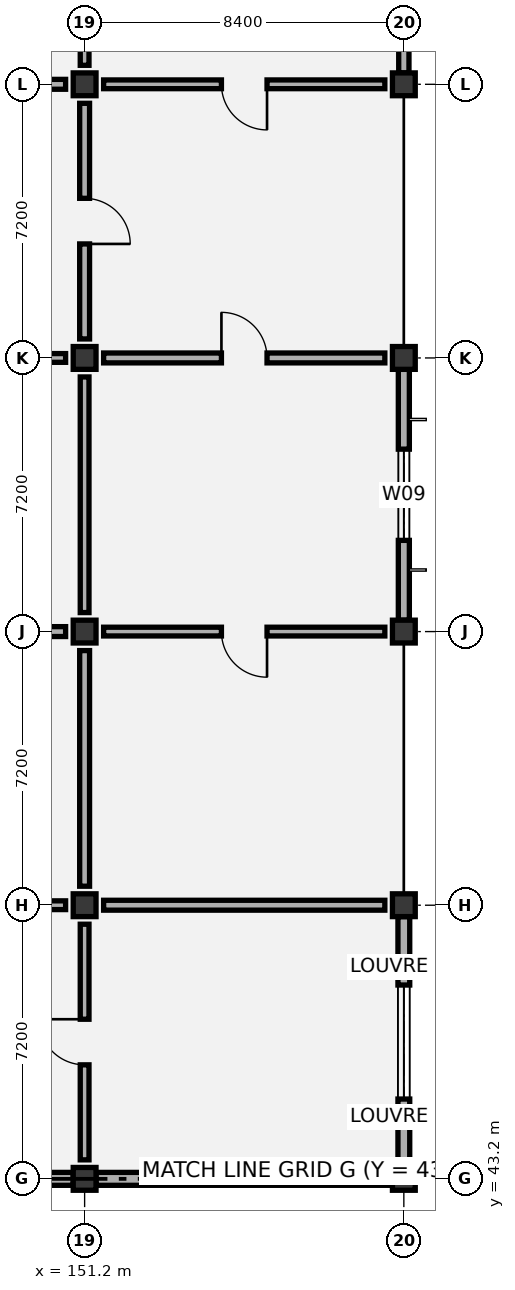
"""IFC4 building model, lengths in metres.
Left out: names, types, materials, properties, quantities, classifications, styles, units other than length and angle.
Written with IfcOpenShell. Run it as: python <this file> out.ifc"""

import sys

from ifc_helpers import new_model, si_unit, direction, frame, frame_2d, origin, origin_2d, place, context, subcontext, project, spatial, rectangle, extrude, element, fill, save


model = new_model("IFC4")
c1 = context("Model", 3, precision=1e-05, world=origin(), true_north=direction((0.0, 1.0)))
c2 = subcontext(c1, "Body", "Model", "MODEL_VIEW")
j1 = project(units=[si_unit("LENGTHUNIT", "METRE"), si_unit("PLANEANGLEUNIT", "RADIAN")], contexts=[c1])
p1 = place(None, origin())
s1 = spatial("IfcSite", under=j1, at=p1, CompositionType="ELEMENT")
p2 = place(p1, origin())
s2 = spatial("IfcBuilding", under=s1, at=p2, CompositionType="ELEMENT")
p3 = place(p2, frame((0.0, 0.0, 11.4)))
s3 = spatial("IfcBuildingStorey", under=s2, at=p3, CompositionType="ELEMENT", Elevation=11.4)
for number, where, z_axis, x_axis in (
    (1, (151.2, 43.2, 0.0), (0.0, 0.0, 1.0), (1.0, 0.0, 0.0)),
    (2, (151.2, 50.4, 0.0), (0.0, 0.0, 1.0), (1.0, 0.0, 0.0)),
    (3, (151.2, 57.6, 0.0), (0.0, 0.0, 1.0), (1.0, 0.0, 0.0)),
    (4, (151.2, 64.8, 0.0), (0.0, 0.0, 1.0), (1.0, 0.0, 0.0)),
    (5, (151.2, 72.0, 0.0), (0.0, 0.0, 1.0), (1.0, 0.0, 0.0)),
    (6, (159.6, 43.2, 0.0), (0.0, 0.0, 1.0), (1.0, 0.0, 0.0)),
    (7, (159.6, 50.4, 0.0), (0.0, 0.0, 1.0), (1.0, 0.0, 0.0)),
    (8, (159.6, 57.6, 0.0), (0.0, 0.0, 1.0), (1.0, 0.0, 0.0)),
    (9, (159.6, 64.8, 0.0), (0.0, 0.0, 1.0), (1.0, 0.0, 0.0)),
    (10, (159.6, 72.0, 0.0), (0.0, 0.0, 1.0), (1.0, 0.0, 0.0)),
):
    element("IfcColumn", number, at=place(p3, frame(where, z_axis=z_axis, x_axis=x_axis)), inside=s3, PredefinedType="COLUMN", context=c2, shape_type="SweptSolid", body=[
        extrude(rectangle(XDim=0.6, YDim=0.6, at=origin_2d()), origin(), (0.0, 0.0, 1.0), 5.4),
    ])
p4 = place(p3, frame((143.1, 43.2, 0.0), z_axis=(0.0, 0.0, 1.0), x_axis=(1.0, 0.0, 0.0)))
e11 = element("IfcWall", 11, at=p4, inside=s3, PredefinedType="SOLIDWALL", context=c2, shape_type="SweptSolid", body=[
    extrude(rectangle(XDim=7.8, YDim=0.34, at=frame_2d((3.9, 0.0))), origin(), (0.0, 0.0, 1.0), 4.445),
])
p5 = place(p3, frame((151.5, 43.2, 0.0), z_axis=(0.0, 0.0, 1.0), x_axis=(1.0, 0.0, 0.0)))
e12 = element("IfcWall", 12, at=p5, inside=s3, PredefinedType="SOLIDWALL", context=c2, shape_type="SweptSolid", body=[
    extrude(rectangle(XDim=7.8, YDim=0.34, at=frame_2d((3.9, 0.0))), origin(), (0.0, 0.0, 1.0), 4.52),
])
p6 = place(p3, frame((159.6, 43.5, 0.0), z_axis=(0.0, 0.0, 1.0), x_axis=(0.0, 1.0, 0.0)))
e13 = element("IfcWall", 13, at=p6, inside=s3, PredefinedType="SOLIDWALL", context=c2, shape_type="SweptSolid", body=[
    extrude(rectangle(XDim=6.6, YDim=0.31, at=frame_2d((3.3, 0.0))), origin(), (0.0, 0.0, 1.0), 4.52),
])
p7 = place(p6, frame((1.8, 0.0, 0.9)))
e14 = element("IfcOpeningElement", 14, at=p7, cuts=e13, PredefinedType="OPENING", context=c2, shape_type="SweptSolid", body=[
    extrude(rectangle(XDim=3.0, YDim=2.1, at=frame_2d((1.5, 1.05))), frame((0.0, 0.165, 0.0), z_axis=(0.0, -1.0, 0.0), x_axis=(1.0, 0.0, 0.0)), (0.0, 0.0, 1.0), 0.33),
])
p8 = place(p3, frame((159.6, 57.9, 0.0), z_axis=(0.0, 0.0, 1.0), x_axis=(0.0, 1.0, 0.0)))
e15 = element("IfcWall", 15, at=p8, inside=s3, PredefinedType="SOLIDWALL", context=c2, shape_type="SweptSolid", body=[
    extrude(rectangle(XDim=6.6, YDim=0.29, at=frame_2d((3.3, 0.0))), origin(), (0.0, 0.0, 1.0), 4.52),
])
p9 = place(p8, frame((2.1, 0.0, 0.9)))
e16 = element("IfcOpeningElement", 16, at=p9, cuts=e15, PredefinedType="OPENING", context=c2, shape_type="SweptSolid", body=[
    extrude(rectangle(XDim=2.4, YDim=2.1, at=frame_2d((1.2, 1.05))), frame((0.0, 0.155, 0.0), z_axis=(0.0, -1.0, 0.0), x_axis=(1.0, 0.0, 0.0)), (0.0, 0.0, 1.0), 0.31),
])
p10 = place(p3, frame((159.6, 72.3, 0.0), z_axis=(0.0, 0.0, 1.0), x_axis=(0.0, 1.0, 0.0)))
e17 = element("IfcWall", 17, at=p10, inside=s3, PredefinedType="SOLIDWALL", context=c2, shape_type="SweptSolid", body=[
    extrude(rectangle(XDim=6.6, YDim=0.27, at=frame_2d((3.3, 0.0))), origin(), (0.0, 0.0, 1.0), 4.52),
])
p11 = place(p10, frame((1.5, 0.0, 0.9)))
e18 = element("IfcOpeningElement", 18, at=p11, cuts=e17, PredefinedType="OPENING", context=c2, shape_type="SweptSolid", body=[
    extrude(rectangle(XDim=3.6, YDim=2.4, at=frame_2d((1.8, 1.2))), frame((0.0, 0.145, 0.0), z_axis=(0.0, -1.0, 0.0), x_axis=(1.0, 0.0, 0.0)), (0.0, 0.0, 1.0), 0.29),
])
p12 = place(p3, frame((159.72, 43.2, 0.0), z_axis=(0.0, 0.0, 1.0), x_axis=(1.0, 0.0, 0.0)))
e19 = element("IfcWall", 19, at=p12, inside=s3, PredefinedType="PARAPET", context=c2, shape_type="SweptSolid", body=[
    extrude(rectangle(XDim=8.16, YDim=0.22, at=frame_2d((4.08, 0.0))), origin(), (0.0, 0.0, 1.0), 1.15),
])
p13 = place(p3, frame((151.2, 43.7, 0.0), z_axis=(0.0, 0.0, 1.0), x_axis=(0.0, 1.0, 0.0)))
e20 = element("IfcWall", 20, at=p13, inside=s3, PredefinedType="PARTITIONING", context=c2, shape_type="SweptSolid", body=[
    extrude(rectangle(XDim=6.2, YDim=0.23, at=frame_2d((3.1, 0.0))), origin(), (0.0, 0.0, 1.0), 4.805),
])
p14 = place(p13, frame((2.5, 0.0, 0.0)))
e21 = element("IfcOpeningElement", 21, at=p14, cuts=e20, PredefinedType="OPENING", context=c2, shape_type="SweptSolid", body=[
    extrude(rectangle(XDim=1.2, YDim=2.1, at=frame_2d((0.6, 1.05))), frame((0.0, 0.125, 0.0), z_axis=(0.0, -1.0, 0.0), x_axis=(1.0, 0.0, 0.0)), (0.0, 0.0, 1.0), 0.25),
])
p15 = place(p3, frame((143.3, 50.4, 0.0), z_axis=(0.0, 0.0, 1.0), x_axis=(1.0, 0.0, 0.0)))
e22 = element("IfcWall", 22, at=p15, inside=s3, PredefinedType="PARTITIONING", context=c2, shape_type="SweptSolid", body=[
    extrude(rectangle(XDim=7.4, YDim=0.23, at=frame_2d((3.7, 0.0))), origin(), (0.0, 0.0, 1.0), 4.345),
])
p16 = place(p3, frame((151.2, 50.9, 0.0), z_axis=(0.0, 0.0, 1.0), x_axis=(0.0, 1.0, 0.0)))
e23 = element("IfcWall", 23, at=p16, inside=s3, PredefinedType="PARTITIONING", context=c2, shape_type="SweptSolid", body=[
    extrude(rectangle(XDim=6.2, YDim=0.26, at=frame_2d((3.1, 0.0))), origin(), (0.0, 0.0, 1.0), 4.395),
])
p17 = place(p3, frame((143.3, 57.6, 0.0), z_axis=(0.0, 0.0, 1.0), x_axis=(1.0, 0.0, 0.0)))
e24 = element("IfcWall", 24, at=p17, inside=s3, PredefinedType="PARTITIONING", context=c2, shape_type="SweptSolid", body=[
    extrude(rectangle(XDim=7.4, YDim=0.26, at=frame_2d((3.7, 0.0))), origin(), (0.0, 0.0, 1.0), 4.345),
])
p18 = place(p17, frame((3.1, 0.0, 0.0)))
e25 = element("IfcOpeningElement", 25, at=p18, cuts=e24, PredefinedType="OPENING", context=c2, shape_type="SweptSolid", body=[
    extrude(rectangle(XDim=1.2, YDim=2.1, at=frame_2d((0.6, 1.05))), frame((0.0, 0.14, 0.0), z_axis=(0.0, -1.0, 0.0), x_axis=(1.0, 0.0, 0.0)), (0.0, 0.0, 1.0), 0.28),
])
p19 = place(p3, frame((151.2, 58.1, 0.0), z_axis=(0.0, 0.0, 1.0), x_axis=(0.0, 1.0, 0.0)))
e26 = element("IfcWall", 26, at=p19, inside=s3, PredefinedType="PARTITIONING", context=c2, shape_type="SweptSolid", body=[
    extrude(rectangle(XDim=6.2, YDim=0.23, at=frame_2d((3.1, 0.0))), origin(), (0.0, 0.0, 1.0), 4.595),
])
p20 = place(p3, frame((143.3, 64.8, 0.0), z_axis=(0.0, 0.0, 1.0), x_axis=(1.0, 0.0, 0.0)))
e27 = element("IfcWall", 27, at=p20, inside=s3, PredefinedType="PARTITIONING", context=c2, shape_type="SweptSolid", body=[
    extrude(rectangle(XDim=7.4, YDim=0.23, at=frame_2d((3.7, 0.0))), origin(), (0.0, 0.0, 1.0), 4.345),
])
p21 = place(p20, frame((3.1, 0.0, 0.0)))
e28 = element("IfcOpeningElement", 28, at=p21, cuts=e27, PredefinedType="OPENING", context=c2, shape_type="SweptSolid", body=[
    extrude(rectangle(XDim=1.2, YDim=2.1, at=frame_2d((0.6, 1.05))), frame((0.0, 0.125, 0.0), z_axis=(0.0, -1.0, 0.0), x_axis=(1.0, 0.0, 0.0)), (0.0, 0.0, 1.0), 0.25),
])
p22 = place(p3, frame((151.2, 65.3, 0.0), z_axis=(0.0, 0.0, 1.0), x_axis=(0.0, 1.0, 0.0)))
e29 = element("IfcWall", 29, at=p22, inside=s3, PredefinedType="PARTITIONING", context=c2, shape_type="SweptSolid", body=[
    extrude(rectangle(XDim=6.2, YDim=0.26, at=frame_2d((3.1, 0.0))), origin(), (0.0, 0.0, 1.0), 4.395),
])
p23 = place(p22, frame((2.5, 0.0, 0.0)))
e30 = element("IfcOpeningElement", 30, at=p23, cuts=e29, PredefinedType="OPENING", context=c2, shape_type="SweptSolid", body=[
    extrude(rectangle(XDim=1.2, YDim=2.1, at=frame_2d((0.6, 1.05))), frame((0.0, 0.14, 0.0), z_axis=(0.0, -1.0, 0.0), x_axis=(1.0, 0.0, 0.0)), (0.0, 0.0, 1.0), 0.28),
])
p24 = place(p3, frame((143.3, 72.0, 0.0), z_axis=(0.0, 0.0, 1.0), x_axis=(1.0, 0.0, 0.0)))
e31 = element("IfcWall", 31, at=p24, inside=s3, PredefinedType="PARTITIONING", context=c2, shape_type="SweptSolid", body=[
    extrude(rectangle(XDim=7.4, YDim=0.26, at=frame_2d((3.7, 0.0))), origin(), (0.0, 0.0, 1.0), 4.345),
])
p25 = place(p24, frame((3.1, 0.0, 0.0)))
e32 = element("IfcOpeningElement", 32, at=p25, cuts=e31, PredefinedType="OPENING", context=c2, shape_type="SweptSolid", body=[
    extrude(rectangle(XDim=1.2, YDim=2.1, at=frame_2d((0.6, 1.05))), frame((0.0, 0.14, 0.0), z_axis=(0.0, -1.0, 0.0), x_axis=(1.0, 0.0, 0.0)), (0.0, 0.0, 1.0), 0.28),
])
p26 = place(p3, frame((151.2, 72.5, 0.0), z_axis=(0.0, 0.0, 1.0), x_axis=(0.0, 1.0, 0.0)))
e33 = element("IfcWall", 33, at=p26, inside=s3, PredefinedType="PARTITIONING", context=c2, shape_type="SweptSolid", body=[
    extrude(rectangle(XDim=6.2, YDim=0.23, at=frame_2d((3.1, 0.0))), origin(), (0.0, 0.0, 1.0), 4.695),
])
p27 = place(p3, frame((151.7, 50.4, 0.0), z_axis=(0.0, 0.0, 1.0), x_axis=(1.0, 0.0, 0.0)))
e34 = element("IfcWall", 34, at=p27, inside=s3, PredefinedType="PARTITIONING", context=c2, shape_type="SweptSolid", body=[
    extrude(rectangle(XDim=7.4, YDim=0.26, at=frame_2d((3.7, 0.0))), origin(), (0.0, 0.0, 1.0), 4.42),
])
p28 = place(p3, frame((151.7, 57.6, 0.0), z_axis=(0.0, 0.0, 1.0), x_axis=(1.0, 0.0, 0.0)))
e35 = element("IfcWall", 35, at=p28, inside=s3, PredefinedType="PARTITIONING", context=c2, shape_type="SweptSolid", body=[
    extrude(rectangle(XDim=7.4, YDim=0.23, at=frame_2d((3.7, 0.0))), origin(), (0.0, 0.0, 1.0), 4.42),
])
p29 = place(p28, frame((3.1, 0.0, 0.0)))
e36 = element("IfcOpeningElement", 36, at=p29, cuts=e35, PredefinedType="OPENING", context=c2, shape_type="SweptSolid", body=[
    extrude(rectangle(XDim=1.2, YDim=2.1, at=frame_2d((0.6, 1.05))), frame((0.0, 0.125, 0.0), z_axis=(0.0, -1.0, 0.0), x_axis=(1.0, 0.0, 0.0)), (0.0, 0.0, 1.0), 0.25),
])
p30 = place(p3, frame((151.7, 64.8, 0.0), z_axis=(0.0, 0.0, 1.0), x_axis=(1.0, 0.0, 0.0)))
e37 = element("IfcWall", 37, at=p30, inside=s3, PredefinedType="PARTITIONING", context=c2, shape_type="SweptSolid", body=[
    extrude(rectangle(XDim=7.4, YDim=0.26, at=frame_2d((3.7, 0.0))), origin(), (0.0, 0.0, 1.0), 4.42),
])
p31 = place(p30, frame((3.1, 0.0, 0.0)))
e38 = element("IfcOpeningElement", 38, at=p31, cuts=e37, PredefinedType="OPENING", context=c2, shape_type="SweptSolid", body=[
    extrude(rectangle(XDim=1.2, YDim=2.1, at=frame_2d((0.6, 1.05))), frame((0.0, 0.14, 0.0), z_axis=(0.0, -1.0, 0.0), x_axis=(1.0, 0.0, 0.0)), (0.0, 0.0, 1.0), 0.28),
])
p32 = place(p3, frame((151.7, 72.0, 0.0), z_axis=(0.0, 0.0, 1.0), x_axis=(1.0, 0.0, 0.0)))
e39 = element("IfcWall", 39, at=p32, inside=s3, PredefinedType="PARTITIONING", context=c2, shape_type="SweptSolid", body=[
    extrude(rectangle(XDim=7.4, YDim=0.23, at=frame_2d((3.7, 0.0))), origin(), (0.0, 0.0, 1.0), 4.42),
])
p33 = place(p32, frame((3.1, 0.0, 0.0)))
e40 = element("IfcOpeningElement", 40, at=p33, cuts=e39, PredefinedType="OPENING", context=c2, shape_type="SweptSolid", body=[
    extrude(rectangle(XDim=1.2, YDim=2.1, at=frame_2d((0.6, 1.05))), frame((0.0, 0.125, 0.0), z_axis=(0.0, -1.0, 0.0), x_axis=(1.0, 0.0, 0.0)), (0.0, 0.0, 1.0), 0.25),
])
p34 = place(p7, origin())
e41 = element("IfcWindow", 41, at=p34, inside=s3, PartitioningType="SINGLE_PANEL", PredefinedType="WINDOW", context=c2, shape_type="SweptSolid", body=[
    extrude(rectangle(XDim=3.0, YDim=2.1, at=frame_2d((1.5, 1.05))), frame((0.0, 0.03, 0.0), z_axis=(0.0, -1.0, 0.0), x_axis=(1.0, 0.0, 0.0)), (0.0, 0.0, 1.0), 0.06),
])
fill(e14, e41)
p35 = place(p9, origin())
e42 = element("IfcWindow", 42, at=p35, inside=s3, PartitioningType="SINGLE_PANEL", PredefinedType="WINDOW", context=c2, shape_type="SweptSolid", body=[
    extrude(rectangle(XDim=2.4, YDim=2.1, at=frame_2d((1.2, 1.05))), frame((0.0, 0.03, 0.0), z_axis=(0.0, -1.0, 0.0), x_axis=(1.0, 0.0, 0.0)), (0.0, 0.0, 1.0), 0.06),
])
fill(e16, e42)
p36 = place(p14, origin())
e43 = element("IfcDoor", 43, at=p36, inside=s3, OperationType="SINGLE_SWING_RIGHT", PredefinedType="DOOR", context=c2, shape_type="SweptSolid", body=[
    extrude(rectangle(XDim=1.2, YDim=2.1, at=frame_2d((0.6, 1.05))), frame((0.0, 0.025, 0.0), z_axis=(0.0, -1.0, 0.0), x_axis=(1.0, 0.0, 0.0)), (0.0, 0.0, 1.0), 0.05),
])
fill(e21, e43)
p37 = place(p23, frame((1.2, 0.0, 0.0), z_axis=(0.0, 0.0, 1.0), x_axis=(-1.0, 0.0, 0.0)))
e44 = element("IfcDoor", 44, at=p37, inside=s3, OperationType="SINGLE_SWING_RIGHT", PredefinedType="DOOR", context=c2, shape_type="SweptSolid", body=[
    extrude(rectangle(XDim=1.2, YDim=2.1, at=frame_2d((0.6, 1.05))), frame((0.0, 0.025, 0.0), z_axis=(0.0, -1.0, 0.0), x_axis=(1.0, 0.0, 0.0)), (0.0, 0.0, 1.0), 0.05),
])
fill(e30, e44)
p38 = place(p29, frame((1.2, 0.0, 0.0), z_axis=(0.0, 0.0, 1.0), x_axis=(-1.0, 0.0, 0.0)))
e45 = element("IfcDoor", 45, at=p38, inside=s3, OperationType="SINGLE_SWING_LEFT", PredefinedType="DOOR", context=c2, shape_type="SweptSolid", body=[
    extrude(rectangle(XDim=1.2, YDim=2.1, at=frame_2d((0.6, 1.05))), frame((0.0, 0.025, 0.0), z_axis=(0.0, -1.0, 0.0), x_axis=(1.0, 0.0, 0.0)), (0.0, 0.0, 1.0), 0.05),
])
fill(e36, e45)
p39 = place(p31, origin())
e46 = element("IfcDoor", 46, at=p39, inside=s3, OperationType="SINGLE_SWING_LEFT", PredefinedType="DOOR", context=c2, shape_type="SweptSolid", body=[
    extrude(rectangle(XDim=1.2, YDim=2.1, at=frame_2d((0.6, 1.05))), frame((0.0, 0.025, 0.0), z_axis=(0.0, -1.0, 0.0), x_axis=(1.0, 0.0, 0.0)), (0.0, 0.0, 1.0), 0.05),
])
fill(e38, e46)
p40 = place(p33, frame((1.2, 0.0, 0.0), z_axis=(0.0, 0.0, 1.0), x_axis=(-1.0, 0.0, 0.0)))
e47 = element("IfcDoor", 47, at=p40, inside=s3, OperationType="SINGLE_SWING_LEFT", PredefinedType="DOOR", context=c2, shape_type="SweptSolid", body=[
    extrude(rectangle(XDim=1.2, YDim=2.1, at=frame_2d((0.6, 1.05))), frame((0.0, 0.025, 0.0), z_axis=(0.0, -1.0, 0.0), x_axis=(1.0, 0.0, 0.0)), (0.0, 0.0, 1.0), 0.05),
])
fill(e40, e47)
save(model, sys.argv[1])
